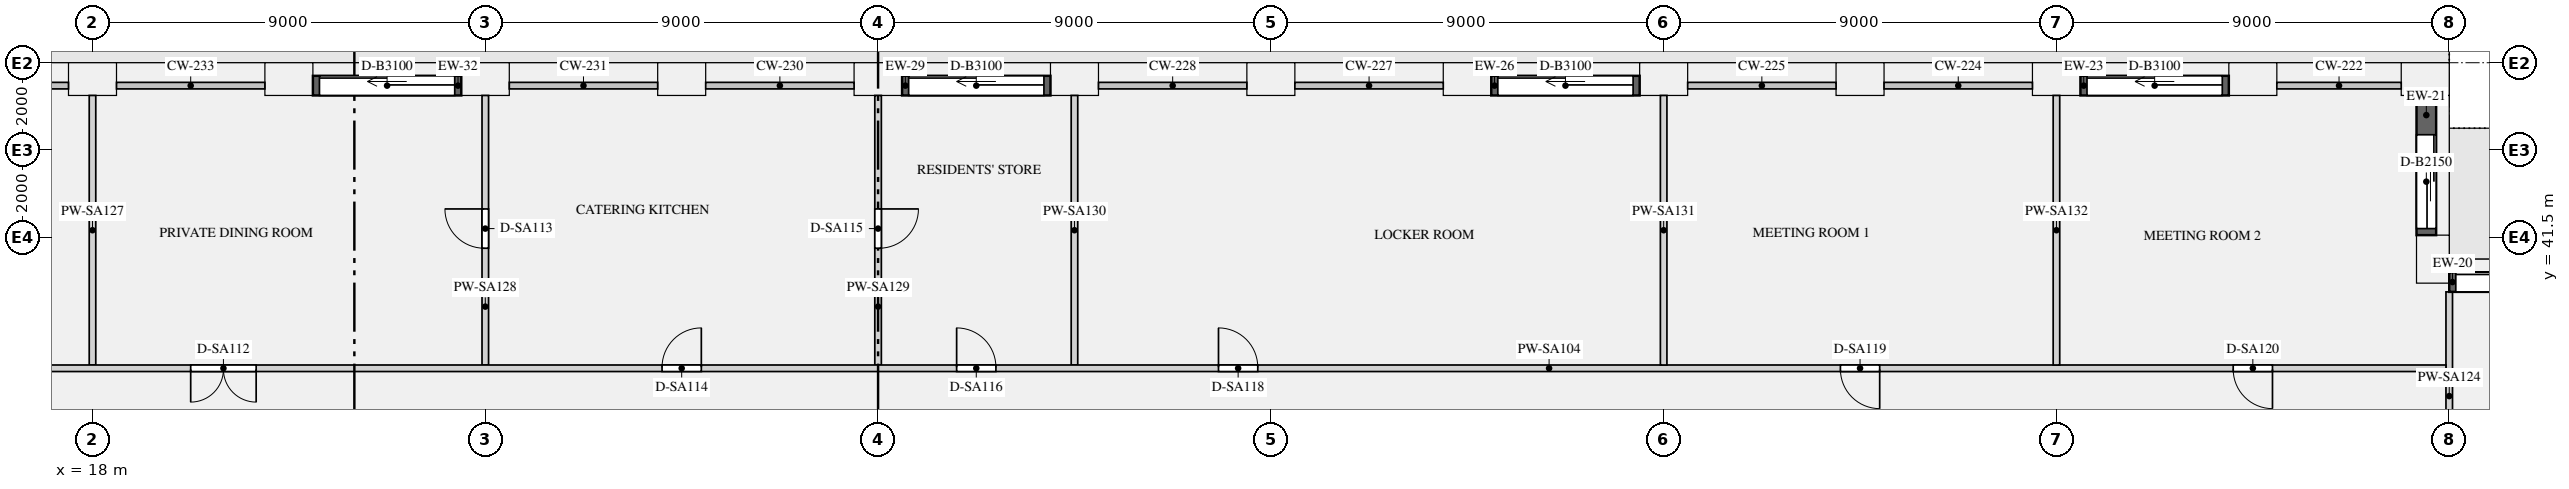
"""IFC4 building model, lengths in metres.
Left out: names, types, materials, properties, quantities, classifications, styles, units other than length and angle.
Written with IfcOpenShell. Run it as: python <this file> out.ifc"""

import sys

from ifc_helpers import new_model, si_unit, direction, frame, frame_2d, origin, origin_2d, place, context, subcontext, project, spatial, rectangle, extrude, element, fill, save


model = new_model("IFC4")
c1 = context("Model", 3, precision=1e-05, world=origin(), true_north=direction((0.0, 1.0)))
c2 = subcontext(c1, "Body", "Model", "MODEL_VIEW")
j1 = project(units=[si_unit("LENGTHUNIT", "METRE"), si_unit("PLANEANGLEUNIT", "RADIAN")], contexts=[c1])
p1 = place(None, origin())
s1 = spatial("IfcSite", under=j1, at=p1, CompositionType="ELEMENT")
p2 = place(p1, origin())
s2 = spatial("IfcBuilding", under=s1, at=p2, CompositionType="ELEMENT")
p3 = place(p2, frame((0.0, 0.0, 77.25)))
s3 = spatial("IfcBuildingStorey", under=s2, at=p3, CompositionType="ELEMENT", Elevation=77.25)
for number, where, z_axis, x_axis in (
    (1, (71.625, 41.0, 0.0), (0.0, 0.0, 1.0), (0.0, 1.0, 0.0)),
    (2, (71.45, 45.125, 0.0), (0.0, 0.0, 1.0), (-1.0, 0.0, 0.0)),
    (3, (67.5, 45.125, 0.0), (0.0, 0.0, 1.0), (-1.0, 0.0, 0.0)),
    (4, (63.0, 45.125, 0.0), (0.0, 0.0, 1.0), (-1.0, 0.0, 0.0)),
    (5, (58.5, 45.125, 0.0), (0.0, 0.0, 1.0), (-1.0, 0.0, 0.0)),
    (6, (54.0, 45.125, 0.0), (0.0, 0.0, 1.0), (-1.0, 0.0, 0.0)),
    (7, (49.5, 45.125, 0.0), (0.0, 0.0, 1.0), (-1.0, 0.0, 0.0)),
    (8, (45.0, 45.125, 0.0), (0.0, 0.0, 1.0), (-1.0, 0.0, 0.0)),
    (9, (40.5, 45.125, 0.0), (0.0, 0.0, 1.0), (-1.0, 0.0, 0.0)),
    (10, (36.0, 45.125, 0.0), (0.0, 0.0, 1.0), (-1.0, 0.0, 0.0)),
    (11, (31.5, 45.125, 0.0), (0.0, 0.0, 1.0), (-1.0, 0.0, 0.0)),
    (12, (27.0, 45.125, 0.0), (0.0, 0.0, 1.0), (-1.0, 0.0, 0.0)),
    (13, (22.5, 45.125, 0.0), (0.0, 0.0, 1.0), (-1.0, 0.0, 0.0)),
    (14, (18.0, 45.125, 0.0), (0.0, 0.0, 1.0), (-1.0, 0.0, 0.0)),
):
    element("IfcColumn", number, at=place(p3, frame(where, z_axis=z_axis, x_axis=x_axis)), inside=s3, PredefinedType="USERDEFINED", context=c2, shape_type="SweptSolid", body=[
        extrude(rectangle(XDim=1.1, YDim=0.75, at=origin_2d()), origin(), (0.0, 0.0, 1.0), 6.3),
    ])
p4 = place(p3, frame((75.4, 40.475, 0.0), z_axis=(0.0, 0.0, 1.0), x_axis=(-1.0, 0.0, 0.0)))
e15 = element("IfcWall", 15, at=p4, inside=s3, PredefinedType="SOLIDWALL", context=c2, shape_type="SweptSolid", body=[
    extrude(rectangle(XDim=3.4, YDim=0.45, at=frame_2d((1.7, 0.0))), origin(), (0.0, 0.0, 1.0), 5.98),
])
p5 = place(p4, frame((0.15, 0.0, 0.0)))
e16 = element("IfcOpeningElement", 16, at=p5, cuts=e15, PredefinedType="OPENING", context=c2, shape_type="SweptSolid", body=[
    extrude(rectangle(XDim=3.1, YDim=2.3, at=frame_2d((1.55, 1.15))), frame((0.0, 0.235, 0.0), z_axis=(0.0, -1.0, 0.0), x_axis=(1.0, 0.0, 0.0)), (0.0, 0.0, 1.0), 0.47),
])
p6 = place(p3, frame((71.475, 41.55, 0.0), z_axis=(0.0, 0.0, 1.0), x_axis=(0.0, 1.0, 0.0)))
e17 = element("IfcWall", 17, at=p6, inside=s3, PredefinedType="SOLIDWALL", context=c2, shape_type="SweptSolid", body=[
    extrude(rectangle(XDim=3.2, YDim=0.45, at=frame_2d((1.6, 0.0))), origin(), (0.0, 0.0, 1.0), 5.98),
])
p7 = place(p6, frame((0.15, 0.0, 0.0)))
e18 = element("IfcOpeningElement", 18, at=p7, cuts=e17, PredefinedType="OPENING", context=c2, shape_type="SweptSolid", body=[
    extrude(rectangle(XDim=2.15, YDim=2.3, at=frame_2d((1.075, 1.15))), frame((0.0, 0.235, 0.0), z_axis=(0.0, -1.0, 0.0), x_axis=(1.0, 0.0, 0.0)), (0.0, 0.0, 1.0), 0.47),
])
p8 = place(p3, frame((66.95, 44.975, 0.0), z_axis=(0.0, 0.0, 1.0), x_axis=(-1.0, 0.0, 0.0)))
e19 = element("IfcWall", 19, at=p8, inside=s3, PredefinedType="SOLIDWALL", context=c2, shape_type="SweptSolid", body=[
    extrude(rectangle(XDim=3.4, YDim=0.45, at=frame_2d((1.7, 0.0))), origin(), (0.0, 0.0, 1.0), 5.98),
])
p9 = place(p8, frame((0.15, 0.0, 0.0)))
e20 = element("IfcOpeningElement", 20, at=p9, cuts=e19, PredefinedType="OPENING", context=c2, shape_type="SweptSolid", body=[
    extrude(rectangle(XDim=3.1, YDim=2.3, at=frame_2d((1.55, 1.15))), frame((0.0, 0.235, 0.0), z_axis=(0.0, -1.0, 0.0), x_axis=(1.0, 0.0, 0.0)), (0.0, 0.0, 1.0), 0.47),
])
p10 = place(p3, frame((53.45, 44.975, 0.0), z_axis=(0.0, 0.0, 1.0), x_axis=(-1.0, 0.0, 0.0)))
e21 = element("IfcWall", 21, at=p10, inside=s3, PredefinedType="SOLIDWALL", context=c2, shape_type="SweptSolid", body=[
    extrude(rectangle(XDim=3.4, YDim=0.45, at=frame_2d((1.7, 0.0))), origin(), (0.0, 0.0, 1.0), 5.98),
])
p11 = place(p10, frame((0.15, 0.0, 0.0)))
e22 = element("IfcOpeningElement", 22, at=p11, cuts=e21, PredefinedType="OPENING", context=c2, shape_type="SweptSolid", body=[
    extrude(rectangle(XDim=3.1, YDim=2.3, at=frame_2d((1.55, 1.15))), frame((0.0, 0.235, 0.0), z_axis=(0.0, -1.0, 0.0), x_axis=(1.0, 0.0, 0.0)), (0.0, 0.0, 1.0), 0.47),
])
p12 = place(p3, frame((39.95, 44.975, 0.0), z_axis=(0.0, 0.0, 1.0), x_axis=(-1.0, 0.0, 0.0)))
e23 = element("IfcWall", 23, at=p12, inside=s3, PredefinedType="SOLIDWALL", context=c2, shape_type="SweptSolid", body=[
    extrude(rectangle(XDim=3.4, YDim=0.45, at=frame_2d((1.7, 0.0))), origin(), (0.0, 0.0, 1.0), 5.98),
])
p13 = place(p12, frame((0.15, 0.0, 0.0)))
e24 = element("IfcOpeningElement", 24, at=p13, cuts=e23, PredefinedType="OPENING", context=c2, shape_type="SweptSolid", body=[
    extrude(rectangle(XDim=3.1, YDim=2.3, at=frame_2d((1.55, 1.15))), frame((0.0, 0.235, 0.0), z_axis=(0.0, -1.0, 0.0), x_axis=(1.0, 0.0, 0.0)), (0.0, 0.0, 1.0), 0.47),
])
p14 = place(p3, frame((26.45, 44.975, 0.0), z_axis=(0.0, 0.0, 1.0), x_axis=(-1.0, 0.0, 0.0)))
e25 = element("IfcWall", 25, at=p14, inside=s3, PredefinedType="SOLIDWALL", context=c2, shape_type="SweptSolid", body=[
    extrude(rectangle(XDim=3.4, YDim=0.45, at=frame_2d((1.7, 0.0))), origin(), (0.0, 0.0, 1.0), 5.98),
])
p15 = place(p14, frame((0.15, 0.0, 0.0)))
e26 = element("IfcOpeningElement", 26, at=p15, cuts=e25, PredefinedType="OPENING", context=c2, shape_type="SweptSolid", body=[
    extrude(rectangle(XDim=3.1, YDim=2.3, at=frame_2d((1.55, 1.15))), frame((0.0, 0.235, 0.0), z_axis=(0.0, -1.0, 0.0), x_axis=(1.0, 0.0, 0.0)), (0.0, 0.0, 1.0), 0.47),
])
p16 = place(p3, frame((13.425, 38.5, 0.0), z_axis=(0.0, 0.0, 1.0), x_axis=(1.0, 0.0, 0.0)))
e27 = element("IfcWall", 27, at=p16, inside=s3, PredefinedType="PARTITIONING", context=c2, shape_type="SweptSolid", body=[
    extrude(rectangle(XDim=58.5, YDim=0.15, at=frame_2d((29.25, 0.0))), origin(), (0.0, 0.0, 1.0), 5.98),
])
p17 = place(p16, frame((1.575, 0.0, 0.0)))
e28 = element("IfcOpeningElement", 28, at=p17, cuts=e27, PredefinedType="OPENING", context=c2, shape_type="SweptSolid", body=[
    extrude(rectangle(XDim=1.5, YDim=2.1, at=frame_2d((0.75, 1.05))), frame((0.0, 0.085, 0.0), z_axis=(0.0, -1.0, 0.0), x_axis=(1.0, 0.0, 0.0)), (0.0, 0.0, 1.0), 0.17),
])
p18 = place(p16, frame((6.825, 0.0, 0.0)))
e29 = element("IfcOpeningElement", 29, at=p18, cuts=e27, PredefinedType="OPENING", context=c2, shape_type="SweptSolid", body=[
    extrude(rectangle(XDim=1.5, YDim=2.1, at=frame_2d((0.75, 1.05))), frame((0.0, 0.085, 0.0), z_axis=(0.0, -1.0, 0.0), x_axis=(1.0, 0.0, 0.0)), (0.0, 0.0, 1.0), 0.17),
])
p19 = place(p16, frame((17.625, 0.0, 0.0)))
e30 = element("IfcOpeningElement", 30, at=p19, cuts=e27, PredefinedType="OPENING", context=c2, shape_type="SweptSolid", body=[
    extrude(rectangle(XDim=0.9, YDim=2.1, at=frame_2d((0.45, 1.05))), frame((0.0, 0.085, 0.0), z_axis=(0.0, -1.0, 0.0), x_axis=(1.0, 0.0, 0.0)), (0.0, 0.0, 1.0), 0.17),
])
p20 = place(p16, frame((24.375, 0.0, 0.0)))
e31 = element("IfcOpeningElement", 31, at=p20, cuts=e27, PredefinedType="OPENING", context=c2, shape_type="SweptSolid", body=[
    extrude(rectangle(XDim=0.9, YDim=2.1, at=frame_2d((0.45, 1.05))), frame((0.0, 0.085, 0.0), z_axis=(0.0, -1.0, 0.0), x_axis=(1.0, 0.0, 0.0)), (0.0, 0.0, 1.0), 0.17),
])
p21 = place(p16, frame((30.375, 0.0, 0.0)))
e32 = element("IfcOpeningElement", 32, at=p21, cuts=e27, PredefinedType="OPENING", context=c2, shape_type="SweptSolid", body=[
    extrude(rectangle(XDim=0.9, YDim=2.1, at=frame_2d((0.45, 1.05))), frame((0.0, 0.085, 0.0), z_axis=(0.0, -1.0, 0.0), x_axis=(1.0, 0.0, 0.0)), (0.0, 0.0, 1.0), 0.17),
])
p22 = place(p16, frame((44.625, 0.0, 0.0)))
e33 = element("IfcOpeningElement", 33, at=p22, cuts=e27, PredefinedType="OPENING", context=c2, shape_type="SweptSolid", body=[
    extrude(rectangle(XDim=0.9, YDim=2.1, at=frame_2d((0.45, 1.05))), frame((0.0, 0.085, 0.0), z_axis=(0.0, -1.0, 0.0), x_axis=(1.0, 0.0, 0.0)), (0.0, 0.0, 1.0), 0.17),
])
p23 = place(p16, frame((53.625, 0.0, 0.0)))
e34 = element("IfcOpeningElement", 34, at=p23, cuts=e27, PredefinedType="OPENING", context=c2, shape_type="SweptSolid", body=[
    extrude(rectangle(XDim=0.9, YDim=2.1, at=frame_2d((0.45, 1.05))), frame((0.0, 0.085, 0.0), z_axis=(0.0, -1.0, 0.0), x_axis=(1.0, 0.0, 0.0)), (0.0, 0.0, 1.0), 0.17),
])
p24 = place(p3, frame((72.0, 35.475, 0.0), z_axis=(0.0, 0.0, 1.0), x_axis=(0.0, 1.0, 0.0)))
e35 = element("IfcWall", 35, at=p24, inside=s3, PredefinedType="PARTITIONING", context=c2, shape_type="SweptSolid", body=[
    extrude(rectangle(XDim=4.775, YDim=0.15, at=frame_2d((2.387, 0.0))), origin(), (0.0, 0.0, 1.0), 5.98),
])
p25 = place(p3, frame((18.0, 38.575, 0.0), z_axis=(0.0, 0.0, 1.0), x_axis=(0.0, 1.0, 0.0)))
e36 = element("IfcWall", 36, at=p25, inside=s3, PredefinedType="PARTITIONING", context=c2, shape_type="SweptSolid", body=[
    extrude(rectangle(XDim=6.175, YDim=0.15, at=frame_2d((3.087, 0.0))), origin(), (0.0, 0.0, 1.0), 5.98),
])
p26 = place(p3, frame((27.0, 38.575, 0.0), z_axis=(0.0, 0.0, 1.0), x_axis=(0.0, 1.0, 0.0)))
e37 = element("IfcWall", 37, at=p26, inside=s3, PredefinedType="PARTITIONING", context=c2, shape_type="SweptSolid", body=[
    extrude(rectangle(XDim=6.175, YDim=0.15, at=frame_2d((3.087, 0.0))), origin(), (0.0, 0.0, 1.0), 5.98),
])
p27 = place(p26, frame((2.675, 0.0, 0.0)))
e38 = element("IfcOpeningElement", 38, at=p27, cuts=e37, PredefinedType="OPENING", context=c2, shape_type="SweptSolid", body=[
    extrude(rectangle(XDim=0.9, YDim=2.1, at=frame_2d((0.45, 1.05))), frame((0.0, 0.085, 0.0), z_axis=(0.0, -1.0, 0.0), x_axis=(1.0, 0.0, 0.0)), (0.0, 0.0, 1.0), 0.17),
])
p28 = place(p3, frame((36.0, 38.575, 0.0), z_axis=(0.0, 0.0, 1.0), x_axis=(0.0, 1.0, 0.0)))
e39 = element("IfcWall", 39, at=p28, inside=s3, PredefinedType="PARTITIONING", context=c2, shape_type="SweptSolid", body=[
    extrude(rectangle(XDim=6.175, YDim=0.15, at=frame_2d((3.087, 0.0))), origin(), (0.0, 0.0, 1.0), 5.98),
])
p29 = place(p28, frame((2.675, 0.0, 0.0)))
e40 = element("IfcOpeningElement", 40, at=p29, cuts=e39, PredefinedType="OPENING", context=c2, shape_type="SweptSolid", body=[
    extrude(rectangle(XDim=0.9, YDim=2.1, at=frame_2d((0.45, 1.05))), frame((0.0, 0.085, 0.0), z_axis=(0.0, -1.0, 0.0), x_axis=(1.0, 0.0, 0.0)), (0.0, 0.0, 1.0), 0.17),
])
for number, where, z_axis, x_axis in (
    (41, (40.5, 38.575, 0.0), (0.0, 0.0, 1.0), (0.0, 1.0, 0.0)),
    (42, (54.0, 38.575, 0.0), (0.0, 0.0, 1.0), (0.0, 1.0, 0.0)),
    (43, (63.0, 38.575, 0.0), (0.0, 0.0, 1.0), (0.0, 1.0, 0.0)),
):
    element("IfcWall", number, at=place(p3, frame(where, z_axis=z_axis, x_axis=x_axis)), inside=s3, PredefinedType="PARTITIONING", context=c2, shape_type="SweptSolid", body=[
        extrude(rectangle(XDim=6.175, YDim=0.15, at=frame_2d((3.087, 0.0))), origin(), (0.0, 0.0, 1.0), 5.98),
    ])
p30 = place(p5, origin())
e44 = element("IfcDoor", 44, at=p30, inside=s3, OperationType="SLIDING_TO_LEFT", PredefinedType="DOOR", context=c2, shape_type="SweptSolid", body=[
    extrude(rectangle(XDim=3.1, YDim=2.3, at=frame_2d((1.55, 1.15))), frame((0.0, -0.07, 0.0), z_axis=(0.0, -1.0, 0.0), x_axis=(1.0, 0.0, 0.0)), (0.0, 0.0, 1.0), 0.05),
])
fill(e16, e44)
p31 = place(p7, origin())
e45 = element("IfcDoor", 45, at=p31, inside=s3, OperationType="SLIDING_TO_LEFT", PredefinedType="DOOR", context=c2, shape_type="SweptSolid", body=[
    extrude(rectangle(XDim=2.15, YDim=2.3, at=frame_2d((1.075, 1.15))), frame((0.0, -0.07, 0.0), z_axis=(0.0, -1.0, 0.0), x_axis=(1.0, 0.0, 0.0)), (0.0, 0.0, 1.0), 0.05),
])
fill(e18, e45)
p32 = place(p9, origin())
e46 = element("IfcDoor", 46, at=p32, inside=s3, OperationType="SLIDING_TO_LEFT", PredefinedType="DOOR", context=c2, shape_type="SweptSolid", body=[
    extrude(rectangle(XDim=3.1, YDim=2.3, at=frame_2d((1.55, 1.15))), frame((0.0, -0.07, 0.0), z_axis=(0.0, -1.0, 0.0), x_axis=(1.0, 0.0, 0.0)), (0.0, 0.0, 1.0), 0.05),
])
fill(e20, e46)
p33 = place(p11, origin())
e47 = element("IfcDoor", 47, at=p33, inside=s3, OperationType="SLIDING_TO_LEFT", PredefinedType="DOOR", context=c2, shape_type="SweptSolid", body=[
    extrude(rectangle(XDim=3.1, YDim=2.3, at=frame_2d((1.55, 1.15))), frame((0.0, -0.07, 0.0), z_axis=(0.0, -1.0, 0.0), x_axis=(1.0, 0.0, 0.0)), (0.0, 0.0, 1.0), 0.05),
])
fill(e22, e47)
p34 = place(p13, origin())
e48 = element("IfcDoor", 48, at=p34, inside=s3, OperationType="SLIDING_TO_LEFT", PredefinedType="DOOR", context=c2, shape_type="SweptSolid", body=[
    extrude(rectangle(XDim=3.1, YDim=2.3, at=frame_2d((1.55, 1.15))), frame((0.0, -0.07, 0.0), z_axis=(0.0, -1.0, 0.0), x_axis=(1.0, 0.0, 0.0)), (0.0, 0.0, 1.0), 0.05),
])
fill(e24, e48)
p35 = place(p15, origin())
e49 = element("IfcDoor", 49, at=p35, inside=s3, OperationType="SLIDING_TO_LEFT", PredefinedType="DOOR", context=c2, shape_type="SweptSolid", body=[
    extrude(rectangle(XDim=3.1, YDim=2.3, at=frame_2d((1.55, 1.15))), frame((0.0, -0.07, 0.0), z_axis=(0.0, -1.0, 0.0), x_axis=(1.0, 0.0, 0.0)), (0.0, 0.0, 1.0), 0.05),
])
fill(e26, e49)
p36 = place(p18, frame((1.5, 0.0, 0.0), z_axis=(0.0, 0.0, 1.0), x_axis=(-1.0, 0.0, 0.0)))
e50 = element("IfcDoor", 50, at=p36, inside=s3, OperationType="DOUBLE_DOOR_SINGLE_SWING", PredefinedType="DOOR", context=c2, shape_type="SweptSolid", body=[
    extrude(rectangle(XDim=1.5, YDim=2.1, at=frame_2d((0.75, 1.05))), frame((0.0, 0.025, 0.0), z_axis=(0.0, -1.0, 0.0), x_axis=(1.0, 0.0, 0.0)), (0.0, 0.0, 1.0), 0.05),
])
fill(e29, e50)
p37 = place(p27, origin())
e51 = element("IfcDoor", 51, at=p37, inside=s3, OperationType="SINGLE_SWING_RIGHT", PredefinedType="DOOR", context=c2, shape_type="SweptSolid", body=[
    extrude(rectangle(XDim=0.9, YDim=2.1, at=frame_2d((0.45, 1.05))), frame((0.0, 0.025, 0.0), z_axis=(0.0, -1.0, 0.0), x_axis=(1.0, 0.0, 0.0)), (0.0, 0.0, 1.0), 0.05),
])
fill(e38, e51)
p38 = place(p19, origin())
e52 = element("IfcDoor", 52, at=p38, inside=s3, OperationType="SINGLE_SWING_RIGHT", PredefinedType="DOOR", context=c2, shape_type="SweptSolid", body=[
    extrude(rectangle(XDim=0.9, YDim=2.1, at=frame_2d((0.45, 1.05))), frame((0.0, 0.025, 0.0), z_axis=(0.0, -1.0, 0.0), x_axis=(1.0, 0.0, 0.0)), (0.0, 0.0, 1.0), 0.05),
])
fill(e30, e52)
p39 = place(p29, frame((0.9, 0.0, 0.0), z_axis=(0.0, 0.0, 1.0), x_axis=(-1.0, 0.0, 0.0)))
e53 = element("IfcDoor", 53, at=p39, inside=s3, OperationType="SINGLE_SWING_LEFT", PredefinedType="DOOR", context=c2, shape_type="SweptSolid", body=[
    extrude(rectangle(XDim=0.9, YDim=2.1, at=frame_2d((0.45, 1.05))), frame((0.0, 0.025, 0.0), z_axis=(0.0, -1.0, 0.0), x_axis=(1.0, 0.0, 0.0)), (0.0, 0.0, 1.0), 0.05),
])
fill(e40, e53)
p40 = place(p20, origin())
e54 = element("IfcDoor", 54, at=p40, inside=s3, OperationType="SINGLE_SWING_LEFT", PredefinedType="DOOR", context=c2, shape_type="SweptSolid", body=[
    extrude(rectangle(XDim=0.9, YDim=2.1, at=frame_2d((0.45, 1.05))), frame((0.0, 0.025, 0.0), z_axis=(0.0, -1.0, 0.0), x_axis=(1.0, 0.0, 0.0)), (0.0, 0.0, 1.0), 0.05),
])
fill(e31, e54)
p41 = place(p21, origin())
e55 = element("IfcDoor", 55, at=p41, inside=s3, OperationType="SINGLE_SWING_LEFT", PredefinedType="DOOR", context=c2, shape_type="SweptSolid", body=[
    extrude(rectangle(XDim=0.9, YDim=2.1, at=frame_2d((0.45, 1.05))), frame((0.0, 0.025, 0.0), z_axis=(0.0, -1.0, 0.0), x_axis=(1.0, 0.0, 0.0)), (0.0, 0.0, 1.0), 0.05),
])
fill(e32, e55)
p42 = place(p22, frame((0.9, 0.0, 0.0), z_axis=(0.0, 0.0, 1.0), x_axis=(-1.0, 0.0, 0.0)))
e56 = element("IfcDoor", 56, at=p42, inside=s3, OperationType="SINGLE_SWING_LEFT", PredefinedType="DOOR", context=c2, shape_type="SweptSolid", body=[
    extrude(rectangle(XDim=0.9, YDim=2.1, at=frame_2d((0.45, 1.05))), frame((0.0, 0.025, 0.0), z_axis=(0.0, -1.0, 0.0), x_axis=(1.0, 0.0, 0.0)), (0.0, 0.0, 1.0), 0.05),
])
fill(e33, e56)
p43 = place(p23, frame((0.9, 0.0, 0.0), z_axis=(0.0, 0.0, 1.0), x_axis=(-1.0, 0.0, 0.0)))
e57 = element("IfcDoor", 57, at=p43, inside=s3, OperationType="SINGLE_SWING_LEFT", PredefinedType="DOOR", context=c2, shape_type="SweptSolid", body=[
    extrude(rectangle(XDim=0.9, YDim=2.1, at=frame_2d((0.45, 1.05))), frame((0.0, 0.025, 0.0), z_axis=(0.0, -1.0, 0.0), x_axis=(1.0, 0.0, 0.0)), (0.0, 0.0, 1.0), 0.05),
])
fill(e34, e57)
save(model, sys.argv[1])
